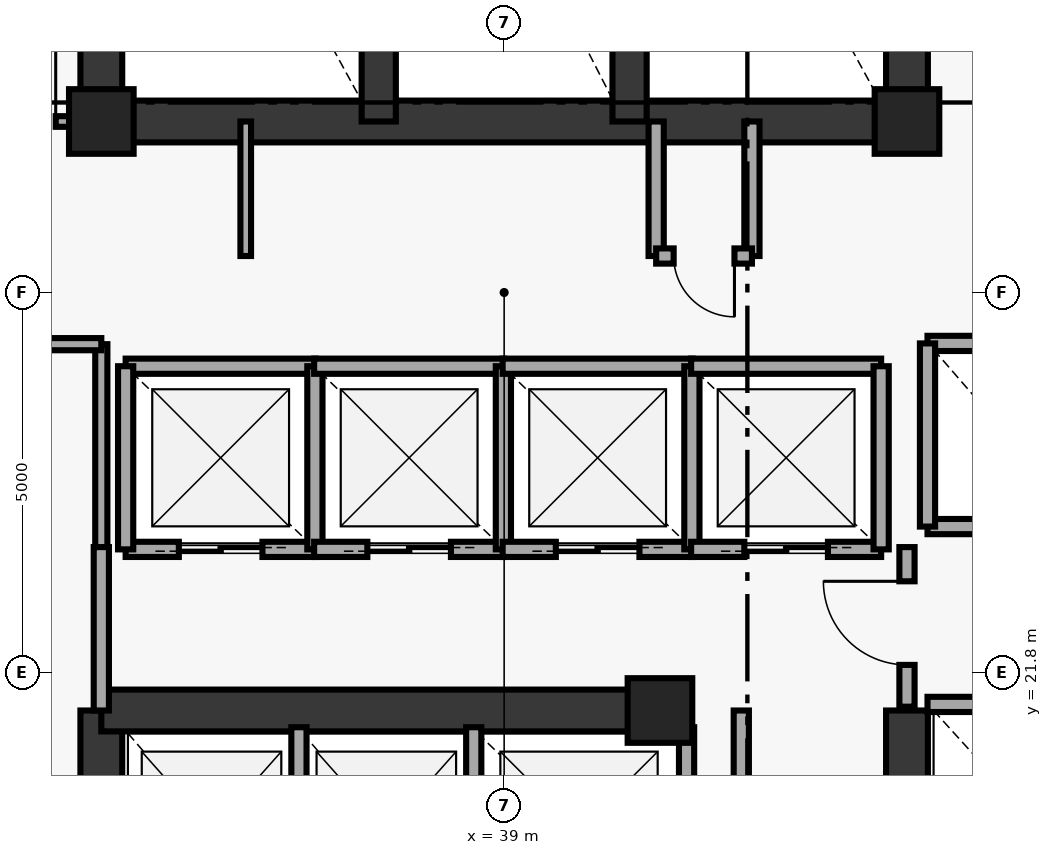
"""IFC4 building model, lengths in metres.
Left out: names, types, materials, properties, quantities, classifications, styles, units other than length and angle.
Written with IfcOpenShell. Run it as: python <this file> out.ifc"""

import sys

from ifc_helpers import new_model, si_unit, direction, frame, frame_2d, origin, origin_2d, place, context, subcontext, project, spatial, rectangle, extrude, element, fill, save


model = new_model("IFC4")
c1 = context("Model", 3, precision=1e-05, world=origin(), true_north=direction((0.0, 1.0)))
c2 = subcontext(c1, "Body", "Model", "MODEL_VIEW")
j1 = project(units=[si_unit("LENGTHUNIT", "METRE"), si_unit("PLANEANGLEUNIT", "RADIAN")], contexts=[c1])
p1 = place(None, origin())
s1 = spatial("IfcSite", under=j1, at=p1, CompositionType="ELEMENT")
p2 = place(p1, origin())
s2 = spatial("IfcBuilding", under=s1, at=p2, CompositionType="ELEMENT")
p3 = place(p2, frame((0.0, 0.0, 208.15)))
s3 = spatial("IfcBuildingStorey", under=s2, at=p3, CompositionType="ELEMENT", Elevation=208.15)
for number, where, z_axis, x_axis in (
    (1, (41.05, 21.3, 0.0), (0.0, 0.0, 1.0), (1.0, 0.0, 0.0)),
    (2, (44.3, 29.05, 0.0), (0.0, 0.0, 1.0), (1.0, 0.0, 0.0)),
    (3, (33.7, 29.05, 0.0), (0.0, 0.0, 1.0), (1.0, 0.0, 0.0)),
):
    element("IfcColumn", number, at=place(p3, frame(where, z_axis=z_axis, x_axis=x_axis)), inside=s3, PredefinedType="PILASTER", context=c2, shape_type="SweptSolid", body=[
        extrude(rectangle(XDim=0.85, YDim=0.85, at=origin_2d()), origin(), (0.0, 0.0, 1.0), 3.41),
    ])
p4 = place(p3, frame((33.7, 29.05, 0.0), z_axis=(0.0, 0.0, 1.0), x_axis=(0.0, 1.0, 0.0)))
e4 = element("IfcWall", 4, at=p4, inside=s3, PredefinedType="SHEAR", context=c2, shape_type="SweptSolid", body=[
    extrude(rectangle(XDim=8.35, YDim=0.55, at=frame_2d((4.175, 0.0))), origin(), (0.0, 0.0, 1.0), 3.41),
])
p5 = place(p3, frame((33.7, 18.35, 0.0), z_axis=(0.0, 0.0, 1.0), x_axis=(0.0, 1.0, 0.0)))
e5 = element("IfcWall", 5, at=p5, inside=s3, PredefinedType="SHEAR", context=c2, shape_type="SweptSolid", body=[
    extrude(rectangle(XDim=2.95, YDim=0.55, at=frame_2d((1.475, 0.0))), origin(), (0.0, 0.0, 1.0), 3.41),
])
p6 = place(p3, frame((44.3, 29.05, 0.0), z_axis=(0.0, 0.0, 1.0), x_axis=(0.0, 1.0, 0.0)))
e6 = element("IfcWall", 6, at=p6, inside=s3, PredefinedType="SHEAR", context=c2, shape_type="SweptSolid", body=[
    extrude(rectangle(XDim=8.35, YDim=0.55, at=frame_2d((4.175, 0.0))), origin(), (0.0, 0.0, 1.0), 3.41),
])
p7 = place(p3, frame((44.3, 18.35, 0.0), z_axis=(0.0, 0.0, 1.0), x_axis=(0.0, 1.0, 0.0)))
e7 = element("IfcWall", 7, at=p7, inside=s3, PredefinedType="SHEAR", context=c2, shape_type="SweptSolid", body=[
    extrude(rectangle(XDim=2.95, YDim=0.55, at=frame_2d((1.475, 0.0))), origin(), (0.0, 0.0, 1.0), 3.41),
])
p8 = place(p3, frame((33.7, 29.05, 0.0), z_axis=(0.0, 0.0, 1.0), x_axis=(1.0, 0.0, 0.0)))
e8 = element("IfcWall", 8, at=p8, inside=s3, PredefinedType="SHEAR", context=c2, shape_type="SweptSolid", body=[
    extrude(rectangle(XDim=10.6, YDim=0.55, at=frame_2d((5.3, 0.0))), origin(), (0.0, 0.0, 1.0), 3.41),
])
p9 = place(p3, frame((33.7, 21.3, 0.0), z_axis=(0.0, 0.0, 1.0), x_axis=(1.0, 0.0, 0.0)))
e9 = element("IfcWall", 9, at=p9, inside=s3, PredefinedType="SHEAR", context=c2, shape_type="SweptSolid", body=[
    extrude(rectangle(XDim=7.55, YDim=0.55, at=frame_2d((3.775, 0.0))), origin(), (0.0, 0.0, 1.0), 3.41),
])
for number, where, z_axis, x_axis in (
    (10, (37.35, 29.05, 0.0), (0.0, 0.0, 1.0), (0.0, 1.0, 0.0)),
    (11, (40.65, 29.05, 0.0), (0.0, 0.0, 1.0), (0.0, 1.0, 0.0)),
):
    element("IfcWall", number, at=place(p3, frame(where, z_axis=z_axis, x_axis=x_axis)), inside=s3, PredefinedType="SHEAR", context=c2, shape_type="SweptSolid", body=[
        extrude(rectangle(XDim=8.35, YDim=0.45, at=frame_2d((4.175, 0.0))), origin(), (0.0, 0.0, 1.0), 3.41),
    ])
p10 = place(p3, frame((35.6, 27.28, 0.0), z_axis=(0.0, 0.0, 1.0), x_axis=(0.0, 1.0, 0.0)))
e12 = element("IfcWall", 12, at=p10, inside=s3, PredefinedType="PARTITIONING", context=c2, shape_type="SweptSolid", body=[
    extrude(rectangle(XDim=1.77, YDim=0.14, at=frame_2d((0.885, 0.0))), origin(), (0.0, 0.0, 1.0), 3.41),
])
for number, where, z_axis, x_axis in (
    (13, (41.0, 27.28, 0.0), (0.0, 0.0, 1.0), (0.0, 1.0, 0.0)),
    (14, (42.26, 27.28, 0.0), (0.0, 0.0, 1.0), (0.0, 1.0, 0.0)),
):
    element("IfcWall", number, at=place(p3, frame(where, z_axis=z_axis, x_axis=x_axis)), inside=s3, PredefinedType="SOLIDWALL", context=c2, shape_type="SweptSolid", body=[
        extrude(rectangle(XDim=1.77, YDim=0.2, at=frame_2d((0.885, 0.0))), origin(), (0.0, 0.0, 1.0), 3.41),
    ])
p11 = place(p3, frame((41.0, 27.28, 0.0), z_axis=(0.0, 0.0, 1.0), x_axis=(1.0, 0.0, 0.0)))
e15 = element("IfcWall", 15, at=p11, inside=s3, PredefinedType="SOLIDWALL", context=c2, shape_type="SweptSolid", body=[
    extrude(rectangle(XDim=1.26, YDim=0.2, at=frame_2d((0.63, 0.0))), origin(), (0.0, 0.0, 1.0), 3.41),
])
p12 = place(p11, frame((0.23, 0.0, 0.0)))
e16 = element("IfcOpeningElement", 16, at=p12, cuts=e15, PredefinedType="OPENING", context=c2, shape_type="SweptSolid", body=[
    extrude(rectangle(XDim=0.8, YDim=2.05, at=frame_2d((0.4, 1.025))), frame((0.0, 0.11, 0.0), z_axis=(0.0, -1.0, 0.0), x_axis=(1.0, 0.0, 0.0)), (0.0, 0.0, 1.0), 0.22),
])
for number, where, z_axis, x_axis in (
    (17, (44.57, 23.72, 0.0), (0.0, 0.0, 1.0), (1.0, 0.0, 0.0)),
    (18, (44.57, 26.13, 0.0), (0.0, 0.0, 1.0), (1.0, 0.0, 0.0)),
):
    element("IfcWall", number, at=place(p3, frame(where, z_axis=z_axis, x_axis=x_axis)), inside=s3, PredefinedType="SOLIDWALL", context=c2, shape_type="SweptSolid", body=[
        extrude(rectangle(XDim=2.11, YDim=0.2, at=frame_2d((1.055, 0.0))), origin(), (0.0, 0.0, 1.0), 3.41),
    ])
p13 = place(p3, frame((44.57, 23.72, 0.0), z_axis=(0.0, 0.0, 1.0), x_axis=(0.0, 1.0, 0.0)))
e19 = element("IfcWall", 19, at=p13, inside=s3, PredefinedType="SOLIDWALL", context=c2, shape_type="SweptSolid", body=[
    extrude(rectangle(XDim=2.41, YDim=0.2, at=frame_2d((1.205, 0.0))), origin(), (0.0, 0.0, 1.0), 3.41),
])
p14 = place(p3, frame((44.57, 21.38, 0.0), z_axis=(0.0, 0.0, 1.0), x_axis=(1.0, 0.0, 0.0)))
e20 = element("IfcWall", 20, at=p14, inside=s3, PredefinedType="SOLIDWALL", context=c2, shape_type="SweptSolid", body=[
    extrude(rectangle(XDim=2.11, YDim=0.2, at=frame_2d((1.055, 0.0))), origin(), (0.0, 0.0, 1.0), 3.41),
])
p15 = place(p3, frame((34.02, 23.42, 0.0), z_axis=(0.0, 0.0, 1.0), x_axis=(1.0, 0.0, 0.0)))
e21 = element("IfcWall", 21, at=p15, inside=s3, PredefinedType="SOLIDWALL", context=c2, shape_type="SweptSolid", body=[
    extrude(rectangle(XDim=2.5, YDim=0.2, at=frame_2d((1.25, 0.0))), origin(), (0.0, 0.0, 1.0), 3.41),
])
p16 = place(p15, frame((0.7, 0.0, 0.0)))
e22 = element("IfcOpeningElement", 22, at=p16, cuts=e21, PredefinedType="OPENING", context=c2, shape_type="SweptSolid", body=[
    extrude(rectangle(XDim=1.1, YDim=2.15, at=frame_2d((0.55, 1.075))), frame((0.0, 0.11, 0.0), z_axis=(0.0, -1.0, 0.0), x_axis=(1.0, 0.0, 0.0)), (0.0, 0.0, 1.0), 0.22),
])
p17 = place(p3, frame((34.02, 25.83, 0.0), z_axis=(0.0, 0.0, 1.0), x_axis=(1.0, 0.0, 0.0)))
e23 = element("IfcWall", 23, at=p17, inside=s3, PredefinedType="SOLIDWALL", context=c2, shape_type="SweptSolid", body=[
    extrude(rectangle(XDim=2.5, YDim=0.2, at=frame_2d((1.25, 0.0))), origin(), (0.0, 0.0, 1.0), 3.41),
])
for number, where, z_axis, x_axis in (
    (24, (34.02, 23.42, 0.0), (0.0, 0.0, 1.0), (0.0, 1.0, 0.0)),
    (25, (36.51, 23.42, 0.0), (0.0, 0.0, 1.0), (0.0, 1.0, 0.0)),
):
    element("IfcWall", number, at=place(p3, frame(where, z_axis=z_axis, x_axis=x_axis)), inside=s3, PredefinedType="SOLIDWALL", context=c2, shape_type="SweptSolid", body=[
        extrude(rectangle(XDim=2.41, YDim=0.2, at=frame_2d((1.205, 0.0))), origin(), (0.0, 0.0, 1.0), 3.41),
    ])
p18 = place(p3, frame((36.5, 23.42, 0.0), z_axis=(0.0, 0.0, 1.0), x_axis=(1.0, 0.0, 0.0)))
e26 = element("IfcWall", 26, at=p18, inside=s3, PredefinedType="SOLIDWALL", context=c2, shape_type="SweptSolid", body=[
    extrude(rectangle(XDim=2.5, YDim=0.2, at=frame_2d((1.25, 0.0))), origin(), (0.0, 0.0, 1.0), 3.41),
])
p19 = place(p18, frame((0.7, 0.0, 0.0)))
e27 = element("IfcOpeningElement", 27, at=p19, cuts=e26, PredefinedType="OPENING", context=c2, shape_type="SweptSolid", body=[
    extrude(rectangle(XDim=1.1, YDim=2.15, at=frame_2d((0.55, 1.075))), frame((0.0, 0.11, 0.0), z_axis=(0.0, -1.0, 0.0), x_axis=(1.0, 0.0, 0.0)), (0.0, 0.0, 1.0), 0.22),
])
p20 = place(p3, frame((36.5, 25.83, 0.0), z_axis=(0.0, 0.0, 1.0), x_axis=(1.0, 0.0, 0.0)))
e28 = element("IfcWall", 28, at=p20, inside=s3, PredefinedType="SOLIDWALL", context=c2, shape_type="SweptSolid", body=[
    extrude(rectangle(XDim=2.5, YDim=0.2, at=frame_2d((1.25, 0.0))), origin(), (0.0, 0.0, 1.0), 3.41),
])
p21 = place(p3, frame((38.99, 23.42, 0.0), z_axis=(0.0, 0.0, 1.0), x_axis=(0.0, 1.0, 0.0)))
e29 = element("IfcWall", 29, at=p21, inside=s3, PredefinedType="SOLIDWALL", context=c2, shape_type="SweptSolid", body=[
    extrude(rectangle(XDim=2.41, YDim=0.2, at=frame_2d((1.205, 0.0))), origin(), (0.0, 0.0, 1.0), 3.41),
])
p22 = place(p3, frame((38.98, 23.42, 0.0), z_axis=(0.0, 0.0, 1.0), x_axis=(1.0, 0.0, 0.0)))
e30 = element("IfcWall", 30, at=p22, inside=s3, PredefinedType="SOLIDWALL", context=c2, shape_type="SweptSolid", body=[
    extrude(rectangle(XDim=2.5, YDim=0.2, at=frame_2d((1.25, 0.0))), origin(), (0.0, 0.0, 1.0), 3.41),
])
p23 = place(p22, frame((0.7, 0.0, 0.0)))
e31 = element("IfcOpeningElement", 31, at=p23, cuts=e30, PredefinedType="OPENING", context=c2, shape_type="SweptSolid", body=[
    extrude(rectangle(XDim=1.1, YDim=2.15, at=frame_2d((0.55, 1.075))), frame((0.0, 0.11, 0.0), z_axis=(0.0, -1.0, 0.0), x_axis=(1.0, 0.0, 0.0)), (0.0, 0.0, 1.0), 0.22),
])
p24 = place(p3, frame((38.98, 25.83, 0.0), z_axis=(0.0, 0.0, 1.0), x_axis=(1.0, 0.0, 0.0)))
e32 = element("IfcWall", 32, at=p24, inside=s3, PredefinedType="SOLIDWALL", context=c2, shape_type="SweptSolid", body=[
    extrude(rectangle(XDim=2.5, YDim=0.2, at=frame_2d((1.25, 0.0))), origin(), (0.0, 0.0, 1.0), 3.41),
])
p25 = place(p3, frame((41.47, 23.42, 0.0), z_axis=(0.0, 0.0, 1.0), x_axis=(0.0, 1.0, 0.0)))
e33 = element("IfcWall", 33, at=p25, inside=s3, PredefinedType="SOLIDWALL", context=c2, shape_type="SweptSolid", body=[
    extrude(rectangle(XDim=2.41, YDim=0.2, at=frame_2d((1.205, 0.0))), origin(), (0.0, 0.0, 1.0), 3.41),
])
p26 = place(p3, frame((41.46, 23.42, 0.0), z_axis=(0.0, 0.0, 1.0), x_axis=(1.0, 0.0, 0.0)))
e34 = element("IfcWall", 34, at=p26, inside=s3, PredefinedType="SOLIDWALL", context=c2, shape_type="SweptSolid", body=[
    extrude(rectangle(XDim=2.5, YDim=0.2, at=frame_2d((1.25, 0.0))), origin(), (0.0, 0.0, 1.0), 3.41),
])
p27 = place(p26, frame((0.7, 0.0, 0.0)))
e35 = element("IfcOpeningElement", 35, at=p27, cuts=e34, PredefinedType="OPENING", context=c2, shape_type="SweptSolid", body=[
    extrude(rectangle(XDim=1.1, YDim=2.15, at=frame_2d((0.55, 1.075))), frame((0.0, 0.11, 0.0), z_axis=(0.0, -1.0, 0.0), x_axis=(1.0, 0.0, 0.0)), (0.0, 0.0, 1.0), 0.22),
])
p28 = place(p3, frame((41.46, 25.83, 0.0), z_axis=(0.0, 0.0, 1.0), x_axis=(1.0, 0.0, 0.0)))
e36 = element("IfcWall", 36, at=p28, inside=s3, PredefinedType="SOLIDWALL", context=c2, shape_type="SweptSolid", body=[
    extrude(rectangle(XDim=2.5, YDim=0.2, at=frame_2d((1.25, 0.0))), origin(), (0.0, 0.0, 1.0), 3.41),
])
p29 = place(p3, frame((43.96, 23.42, 0.0), z_axis=(0.0, 0.0, 1.0), x_axis=(0.0, 1.0, 0.0)))
e37 = element("IfcWall", 37, at=p29, inside=s3, PredefinedType="SOLIDWALL", context=c2, shape_type="SweptSolid", body=[
    extrude(rectangle(XDim=2.41, YDim=0.2, at=frame_2d((1.205, 0.0))), origin(), (0.0, 0.0, 1.0), 3.41),
])
for number, where, z_axis, x_axis in (
    (38, (36.3, 18.37, 0.0), (0.0, 0.0, 1.0), (0.0, 1.0, 0.0)),
    (39, (38.6, 18.37, 0.0), (0.0, 0.0, 1.0), (0.0, 1.0, 0.0)),
    (40, (41.4, 18.37, 0.0), (0.0, 0.0, 1.0), (0.0, 1.0, 0.0)),
):
    element("IfcWall", number, at=place(p3, frame(where, z_axis=z_axis, x_axis=x_axis)), inside=s3, PredefinedType="SOLIDWALL", context=c2, shape_type="SweptSolid", body=[
        extrude(rectangle(XDim=2.71, YDim=0.2, at=frame_2d((1.355, 0.0))), origin(), (0.0, 0.0, 1.0), 3.41),
    ])
p30 = place(p3, frame((33.7, 23.45, 0.0), z_axis=(0.0, 0.0, 1.0), x_axis=(0.0, 1.0, 0.0)))
e41 = element("IfcWall", 41, at=p30, inside=s3, PredefinedType="PARTITIONING", context=c2, shape_type="SweptSolid", body=[
    extrude(rectangle(XDim=2.67, YDim=0.16, at=frame_2d((1.335, 0.0))), origin(), (0.0, 0.0, 1.0), 2.795),
])
p31 = place(p3, frame((33.7, 26.12, 0.0), z_axis=(0.0, 0.0, 1.0), x_axis=(-1.0, 0.0, 0.0)))
e42 = element("IfcWall", 42, at=p31, inside=s3, PredefinedType="PARTITIONING", context=c2, shape_type="SweptSolid", body=[
    extrude(rectangle(XDim=4.65, YDim=0.16, at=frame_2d((2.325, 0.0))), origin(), (0.0, 0.0, 1.0), 3.41),
])
p32 = place(p31, frame((3.1, 0.0, 0.0)))
e43 = element("IfcOpeningElement", 43, at=p32, cuts=e42, PredefinedType="OPENING", context=c2, shape_type="SweptSolid", body=[
    extrude(rectangle(XDim=0.9, YDim=2.1, at=frame_2d((0.45, 1.05))), frame((0.0, 0.09, 0.0), z_axis=(0.0, -1.0, 0.0), x_axis=(1.0, 0.0, 0.0)), (0.0, 0.0, 1.0), 0.18),
])
p33 = place(p31, frame((0.9, 0.0, 0.0)))
e44 = element("IfcOpeningElement", 44, at=p33, cuts=e42, PredefinedType="OPENING", context=c2, shape_type="SweptSolid", body=[
    extrude(rectangle(XDim=0.9, YDim=2.1, at=frame_2d((0.45, 1.05))), frame((0.0, 0.09, 0.0), z_axis=(0.0, -1.0, 0.0), x_axis=(1.0, 0.0, 0.0)), (0.0, 0.0, 1.0), 0.18),
])
p34 = place(p3, frame((33.7, 21.3, 0.0), z_axis=(0.0, 0.0, 1.0), x_axis=(0.0, 1.0, 0.0)))
e45 = element("IfcWall", 45, at=p34, inside=s3, PredefinedType="SOLIDWALL", context=c2, shape_type="SweptSolid", body=[
    extrude(rectangle(XDim=2.15, YDim=0.2, at=frame_2d((1.075, 0.0))), origin(), (0.0, 0.0, 1.0), 2.795),
])
p35 = place(p3, frame((44.3, 21.35, 0.0), z_axis=(0.0, 0.0, 1.0), x_axis=(0.0, 1.0, 0.0)))
e46 = element("IfcWall", 46, at=p35, inside=s3, PredefinedType="SOLIDWALL", context=c2, shape_type="SweptSolid", body=[
    extrude(rectangle(XDim=2.1, YDim=0.2, at=frame_2d((1.05, 0.0))), origin(), (0.0, 0.0, 1.0), 2.795),
])
p36 = place(p35, frame((0.55, 0.0, 0.0)))
e47 = element("IfcOpeningElement", 47, at=p36, cuts=e46, PredefinedType="OPENING", context=c2, shape_type="SweptSolid", body=[
    extrude(rectangle(XDim=1.1, YDim=2.15, at=frame_2d((0.55, 1.075))), frame((0.0, 0.11, 0.0), z_axis=(0.0, -1.0, 0.0), x_axis=(1.0, 0.0, 0.0)), (0.0, 0.0, 1.0), 0.22),
])
p37 = place(p3, frame((42.12, 18.35, 0.0), z_axis=(0.0, 0.0, 1.0), x_axis=(0.0, 1.0, 0.0)))
e48 = element("IfcWall", 48, at=p37, inside=s3, PredefinedType="SOLIDWALL", context=c2, shape_type="SweptSolid", body=[
    extrude(rectangle(XDim=2.95, YDim=0.2, at=frame_2d((1.475, 0.0))), origin(), (0.0, 0.0, 1.0), 3.41),
])
p38 = place(p37, frame((0.2, 0.0, 0.0)))
e49 = element("IfcOpeningElement", 49, at=p38, cuts=e48, PredefinedType="OPENING", context=c2, shape_type="SweptSolid", body=[
    extrude(rectangle(XDim=0.8, YDim=2.05, at=frame_2d((0.4, 1.025))), frame((0.0, 0.11, 0.0), z_axis=(0.0, -1.0, 0.0), x_axis=(1.0, 0.0, 0.0)), (0.0, 0.0, 1.0), 0.22),
])
p39 = place(p3, frame((32.03, 29.05, 0.0), z_axis=(0.0, 0.0, 1.0), x_axis=(1.0, 0.0, 0.0)))
e50 = element("IfcWall", 50, at=p39, inside=s3, PredefinedType="PARTITIONING", context=c2, shape_type="SweptSolid", body=[
    extrude(rectangle(XDim=1.25, YDim=0.14, at=frame_2d((0.625, 0.0))), origin(), (0.0, 0.0, 1.0), 2.55),
])
p40 = place(p39, frame((0.12, 0.0, 0.0)))
e51 = element("IfcOpeningElement", 51, at=p40, cuts=e50, PredefinedType="OPENING", context=c2, shape_type="SweptSolid", body=[
    extrude(rectangle(XDim=0.95, YDim=2.1, at=frame_2d((0.475, 1.05))), frame((0.0, 0.08, 0.0), z_axis=(0.0, -1.0, 0.0), x_axis=(1.0, 0.0, 0.0)), (0.0, 0.0, 1.0), 0.16),
])
p41 = place(p12, origin())
e52 = element("IfcDoor", 52, at=p41, inside=s3, OperationType="SINGLE_SWING_RIGHT", PredefinedType="DOOR", context=c2, shape_type="SweptSolid", body=[
    extrude(rectangle(XDim=0.8, YDim=2.05, at=frame_2d((0.4, 1.025))), frame((0.0, 0.025, 0.0), z_axis=(0.0, -1.0, 0.0), x_axis=(1.0, 0.0, 0.0)), (0.0, 0.0, 1.0), 0.05),
])
fill(e16, e52)
p42 = place(p16, origin())
e53 = element("IfcDoor", 53, at=p42, inside=s3, OperationType="DOUBLE_DOOR_SLIDING", PredefinedType="DOOR", context=c2, shape_type="SweptSolid", body=[
    extrude(rectangle(XDim=1.1, YDim=2.15, at=frame_2d((0.55, 1.075))), frame((0.0, 0.025, 0.0), z_axis=(0.0, -1.0, 0.0), x_axis=(1.0, 0.0, 0.0)), (0.0, 0.0, 1.0), 0.05),
])
fill(e22, e53)
p43 = place(p19, origin())
e54 = element("IfcDoor", 54, at=p43, inside=s3, OperationType="DOUBLE_DOOR_SLIDING", PredefinedType="DOOR", context=c2, shape_type="SweptSolid", body=[
    extrude(rectangle(XDim=1.1, YDim=2.15, at=frame_2d((0.55, 1.075))), frame((0.0, 0.025, 0.0), z_axis=(0.0, -1.0, 0.0), x_axis=(1.0, 0.0, 0.0)), (0.0, 0.0, 1.0), 0.05),
])
fill(e27, e54)
p44 = place(p23, origin())
e55 = element("IfcDoor", 55, at=p44, inside=s3, OperationType="DOUBLE_DOOR_SLIDING", PredefinedType="DOOR", context=c2, shape_type="SweptSolid", body=[
    extrude(rectangle(XDim=1.1, YDim=2.15, at=frame_2d((0.55, 1.075))), frame((0.0, 0.025, 0.0), z_axis=(0.0, -1.0, 0.0), x_axis=(1.0, 0.0, 0.0)), (0.0, 0.0, 1.0), 0.05),
])
fill(e31, e55)
p45 = place(p27, origin())
e56 = element("IfcDoor", 56, at=p45, inside=s3, OperationType="DOUBLE_DOOR_SLIDING", PredefinedType="DOOR", context=c2, shape_type="SweptSolid", body=[
    extrude(rectangle(XDim=1.1, YDim=2.15, at=frame_2d((0.55, 1.075))), frame((0.0, 0.025, 0.0), z_axis=(0.0, -1.0, 0.0), x_axis=(1.0, 0.0, 0.0)), (0.0, 0.0, 1.0), 0.05),
])
fill(e35, e56)
p46 = place(p36, origin())
e57 = element("IfcDoor", 57, at=p46, inside=s3, OperationType="SINGLE_SWING_RIGHT", PredefinedType="DOOR", context=c2, shape_type="SweptSolid", body=[
    extrude(rectangle(XDim=1.1, YDim=2.15, at=frame_2d((0.55, 1.075))), frame((0.0, 0.025, 0.0), z_axis=(0.0, -1.0, 0.0), x_axis=(1.0, 0.0, 0.0)), (0.0, 0.0, 1.0), 0.05),
])
fill(e47, e57)
p47 = place(p40, origin())
e58 = element("IfcDoor", 58, at=p47, inside=s3, OperationType="SINGLE_SWING_RIGHT", PredefinedType="DOOR", context=c2, shape_type="SweptSolid", body=[
    extrude(rectangle(XDim=0.95, YDim=2.1, at=frame_2d((0.475, 1.05))), frame((0.0, 0.025, 0.0), z_axis=(0.0, -1.0, 0.0), x_axis=(1.0, 0.0, 0.0)), (0.0, 0.0, 1.0), 0.05),
])
fill(e51, e58)
save(model, sys.argv[1])
